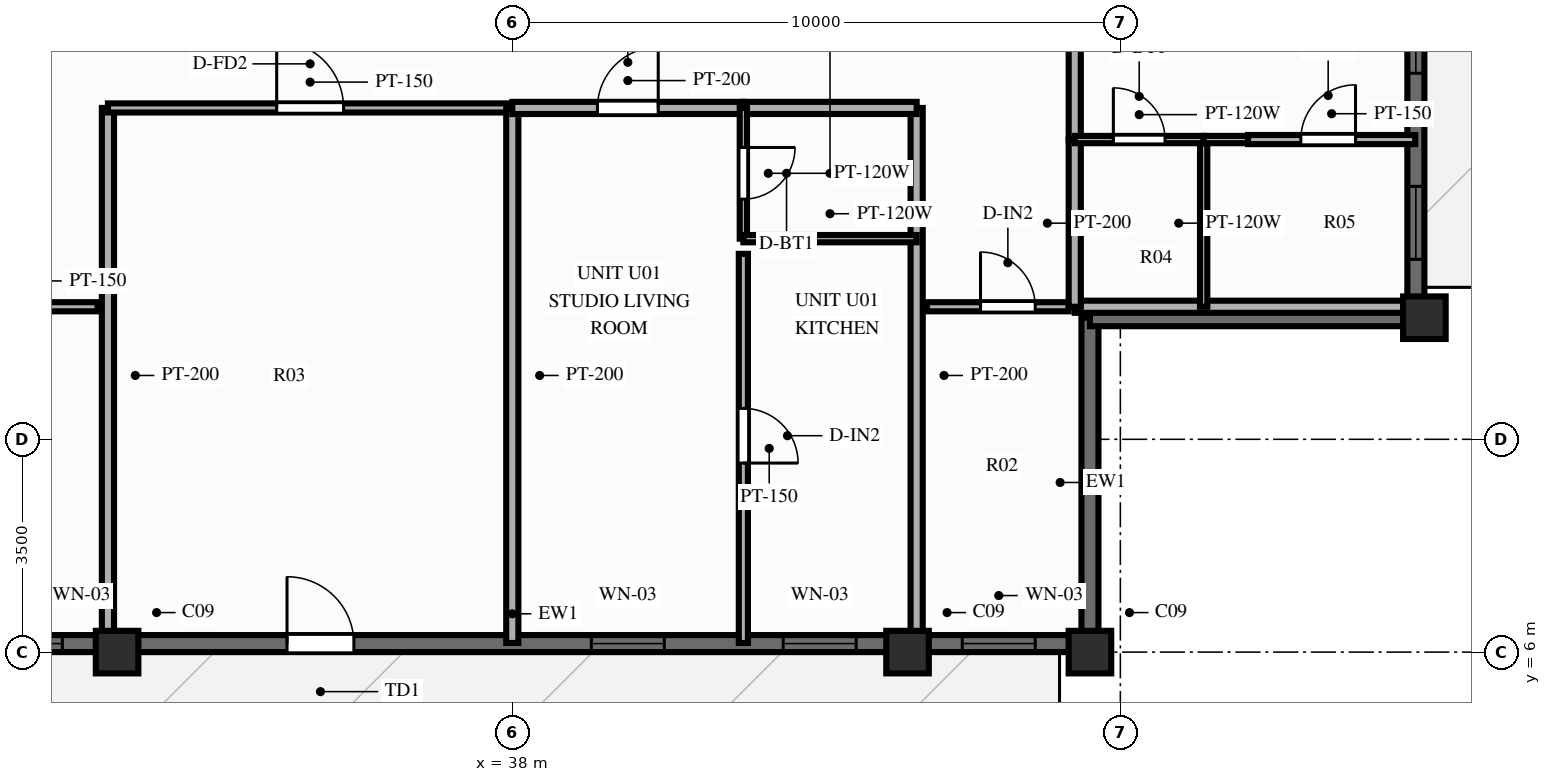
"""IFC4 building model, lengths in metres.
Left out: names, types, materials, properties, quantities, classifications, styles, units other than length and angle.
Written with IfcOpenShell. Run it as: python <this file> out.ifc"""

import sys

from ifc_helpers import new_model, si_unit, direction, frame, frame_2d, origin, origin_2d, place, context, subcontext, project, spatial, rectangle, extrude, source, transform, mapped, element, fill, save


model = new_model("IFC4")
c1 = context("Model", 3, precision=1e-05, world=origin(), true_north=direction((0.0, 1.0)))
c2 = subcontext(c1, "Body", "Model", "MODEL_VIEW")
j1 = project(units=[si_unit("LENGTHUNIT", "METRE"), si_unit("PLANEANGLEUNIT", "RADIAN")], contexts=[c1])
p1 = place(None, origin())
s1 = spatial("IfcSite", under=j1, at=p1, CompositionType="ELEMENT")
p2 = place(p1, origin())
s2 = spatial("IfcBuilding", under=s1, at=p2, CompositionType="ELEMENT")
p3 = place(p2, frame((0.0, 0.0, 240.0)))
s3 = spatial("IfcBuildingStorey", under=s2, at=p3, CompositionType="ELEMENT", Elevation=240.0)
m1 = source(origin(), c2, "Body", "SweptSolid", [
    extrude(rectangle(XDim=0.7, YDim=0.7, at=origin_2d()), origin(), (0.0, 0.0, 1.0), 3.0),
])
for number, where, z_axis, x_axis in (
    (1, (31.5, 6.0, 0.0), (0.0, 0.0, 1.0), (1.0, 0.0, 0.0)),
    (2, (44.5, 6.0, 0.0), (0.0, 0.0, 1.0), (1.0, 0.0, 0.0)),
    (3, (47.5, 6.0, 0.0), (0.0, 0.0, 1.0), (1.0, 0.0, 0.0)),
    (4, (53.0, 11.5, 0.0), (0.0, 0.0, 1.0), (1.0, 0.0, 0.0)),
):
    element("IfcColumn", number, at=place(p3, frame(where, z_axis=z_axis, x_axis=x_axis)), inside=s3, PredefinedType="COLUMN", context=c2, shape_type="MappedRepresentation", body=[
        mapped(m1, transform((0.0, 0.0, 0.0), scale=1.0)),
    ])
p4 = place(p3, frame((28.5, 6.14, 0.0), z_axis=(0.0, 0.0, 1.0), x_axis=(1.0, 0.0, 0.0)))
e5 = element("IfcWall", 5, at=p4, inside=s3, PredefinedType="SOLIDWALL", context=c2, shape_type="SweptSolid", body=[
    extrude(rectangle(XDim=19.0, YDim=0.28, at=frame_2d((9.5, 0.0))), origin(), (0.0, 0.0, 1.0), 2.28),
])
p5 = place(p4, frame((0.9, 0.0, 0.25)))
e6 = element("IfcOpeningElement", 6, at=p5, cuts=e5, PredefinedType="OPENING", context=c2, shape_type="SweptSolid", body=[
    extrude(rectangle(XDim=1.2, YDim=1.5, at=frame_2d((0.6, 0.75))), frame((0.0, 0.152, 0.0), z_axis=(0.0, -1.0, 0.0), x_axis=(1.0, 0.0, 0.0)), (0.0, 0.0, 1.0), 0.304),
])
p6 = place(p4, frame((6.895, 0.0, 0.0), z_axis=(0.0, 0.0, 1.0), x_axis=(-1.0, 0.0, 0.0)))
e7 = element("IfcOpeningElement", 7, at=p6, cuts=e5, PredefinedType="OPENING", context=c2, shape_type="SweptSolid", body=[
    extrude(rectangle(XDim=1.1, YDim=2.15, at=frame_2d((0.55, 1.075))), frame((0.0, 0.152, 0.0), z_axis=(0.0, -1.0, 0.0), x_axis=(1.0, 0.0, 0.0)), (0.0, 0.0, 1.0), 0.304),
])
p7 = place(p4, frame((10.8, 0.0, 0.25)))
e8 = element("IfcOpeningElement", 8, at=p7, cuts=e5, PredefinedType="OPENING", context=c2, shape_type="SweptSolid", body=[
    extrude(rectangle(XDim=1.2, YDim=1.5, at=frame_2d((0.6, 0.75))), frame((0.0, 0.152, 0.0), z_axis=(0.0, -1.0, 0.0), x_axis=(1.0, 0.0, 0.0)), (0.0, 0.0, 1.0), 0.304),
])
p8 = place(p4, frame((13.955, 0.0, 0.25)))
e9 = element("IfcOpeningElement", 9, at=p8, cuts=e5, PredefinedType="OPENING", context=c2, shape_type="SweptSolid", body=[
    extrude(rectangle(XDim=1.2, YDim=1.5, at=frame_2d((0.6, 0.75))), frame((0.0, 0.152, 0.0), z_axis=(0.0, -1.0, 0.0), x_axis=(1.0, 0.0, 0.0)), (0.0, 0.0, 1.0), 0.304),
])
p9 = place(p4, frame((16.9, 0.0, 0.25)))
e10 = element("IfcOpeningElement", 10, at=p9, cuts=e5, PredefinedType="OPENING", context=c2, shape_type="SweptSolid", body=[
    extrude(rectangle(XDim=1.2, YDim=1.5, at=frame_2d((0.6, 0.75))), frame((0.0, 0.152, 0.0), z_axis=(0.0, -1.0, 0.0), x_axis=(1.0, 0.0, 0.0)), (0.0, 0.0, 1.0), 0.304),
])
p10 = place(p3, frame((52.86, 11.5, 0.0), z_axis=(0.0, 0.0, 1.0), x_axis=(0.0, 1.0, 0.0)))
e11 = element("IfcWall", 11, at=p10, inside=s3, PredefinedType="SOLIDWALL", context=c2, shape_type="SweptSolid", body=[
    extrude(rectangle(XDim=31.0, YDim=0.28, at=frame_2d((15.5, 0.0))), origin(), (0.0, 0.0, 1.0), 2.28),
])
p11 = place(p10, frame((0.96, 0.0, 0.25)))
e12 = element("IfcOpeningElement", 12, at=p11, cuts=e11, PredefinedType="OPENING", context=c2, shape_type="SweptSolid", body=[
    extrude(rectangle(XDim=1.2, YDim=1.5, at=frame_2d((0.6, 0.75))), frame((0.0, 0.152, 0.0), z_axis=(0.0, -1.0, 0.0), x_axis=(1.0, 0.0, 0.0)), (0.0, 0.0, 1.0), 0.304),
])
p12 = place(p10, frame((4.02, 0.0, 0.25)))
e13 = element("IfcOpeningElement", 13, at=p12, cuts=e11, PredefinedType="OPENING", context=c2, shape_type="SweptSolid", body=[
    extrude(rectangle(XDim=1.2, YDim=1.5, at=frame_2d((0.6, 0.75))), frame((0.0, 0.152, 0.0), z_axis=(0.0, -1.0, 0.0), x_axis=(1.0, 0.0, 0.0)), (0.0, 0.0, 1.0), 0.304),
])
p13 = place(p10, frame((8.495, 0.0, 0.25)))
e14 = element("IfcOpeningElement", 14, at=p13, cuts=e11, PredefinedType="OPENING", context=c2, shape_type="SweptSolid", body=[
    extrude(rectangle(XDim=1.2, YDim=1.5, at=frame_2d((0.6, 0.75))), frame((0.0, 0.152, 0.0), z_axis=(0.0, -1.0, 0.0), x_axis=(1.0, 0.0, 0.0)), (0.0, 0.0, 1.0), 0.304),
])
p14 = place(p10, frame((12.9, 0.0, 0.25)))
e15 = element("IfcOpeningElement", 15, at=p14, cuts=e11, PredefinedType="OPENING", context=c2, shape_type="SweptSolid", body=[
    extrude(rectangle(XDim=1.2, YDim=1.5, at=frame_2d((0.6, 0.75))), frame((0.0, 0.152, 0.0), z_axis=(0.0, -1.0, 0.0), x_axis=(1.0, 0.0, 0.0)), (0.0, 0.0, 1.0), 0.304),
])
p15 = place(p10, frame((18.75, 0.0, 0.0), z_axis=(0.0, 0.0, 1.0), x_axis=(-1.0, 0.0, 0.0)))
e16 = element("IfcOpeningElement", 16, at=p15, cuts=e11, PredefinedType="OPENING", context=c2, shape_type="SweptSolid", body=[
    extrude(rectangle(XDim=1.6, YDim=2.15, at=frame_2d((0.8, 1.075))), frame((0.0, 0.152, 0.0), z_axis=(0.0, -1.0, 0.0), x_axis=(1.0, 0.0, 0.0)), (0.0, 0.0, 1.0), 0.304),
])
p16 = place(p10, frame((21.755, 0.0, 0.25)))
e17 = element("IfcOpeningElement", 17, at=p16, cuts=e11, PredefinedType="OPENING", context=c2, shape_type="SweptSolid", body=[
    extrude(rectangle(XDim=1.2, YDim=1.5, at=frame_2d((0.6, 0.75))), frame((0.0, 0.152, 0.0), z_axis=(0.0, -1.0, 0.0), x_axis=(1.0, 0.0, 0.0)), (0.0, 0.0, 1.0), 0.304),
])
p17 = place(p10, frame((27.15, 0.0, 0.25)))
e18 = element("IfcOpeningElement", 18, at=p17, cuts=e11, PredefinedType="OPENING", context=c2, shape_type="SweptSolid", body=[
    extrude(rectangle(XDim=1.2, YDim=1.5, at=frame_2d((0.6, 0.75))), frame((0.0, 0.152, 0.0), z_axis=(0.0, -1.0, 0.0), x_axis=(1.0, 0.0, 0.0)), (0.0, 0.0, 1.0), 0.304),
])
for number, where, z_axis, x_axis in (
    (19, (47.5, 6.08, 0.0), (0.0, 0.0, 1.0), (0.0, 1.0, 0.0)),
    (20, (47.5, 11.5, 0.0), (0.0, 0.0, 1.0), (1.0, 0.0, 0.0)),
):
    element("IfcWall", number, at=place(p3, frame(where, z_axis=z_axis, x_axis=x_axis)), inside=s3, PredefinedType="SOLIDWALL", context=c2, shape_type="SweptSolid", body=[
        extrude(rectangle(XDim=5.42, YDim=0.28, at=frame_2d((2.71, 0.0))), origin(), (0.0, 0.0, 1.0), 2.28),
    ])
p18 = place(p3, frame((28.85, 11.68, 0.0), z_axis=(0.0, 0.0, 1.0), x_axis=(1.0, 0.0, 0.0)))
e21 = element("IfcWall", 21, at=p18, inside=s3, PredefinedType="PARTITIONING", context=c2, shape_type="SweptSolid", body=[
    extrude(rectangle(XDim=2.33, YDim=0.15, at=frame_2d((1.165, 0.0))), origin(), (0.0, 0.0, 1.0), 2.79),
])
p19 = place(p18, frame((0.55, 0.0, 0.0)))
e22 = element("IfcOpeningElement", 22, at=p19, cuts=e21, PredefinedType="OPENING", context=c2, shape_type="SweptSolid", body=[
    extrude(rectangle(XDim=0.9, YDim=2.1, at=frame_2d((0.45, 1.05))), frame((0.0, 0.087, 0.0), z_axis=(0.0, -1.0, 0.0), x_axis=(1.0, 0.0, 0.0)), (0.0, 0.0, 1.0), 0.174),
])
p20 = place(p3, frame((44.82, 11.68, 0.0), z_axis=(0.0, 0.0, 1.0), x_axis=(1.0, 0.0, 0.0)))
e23 = element("IfcWall", 23, at=p20, inside=s3, PredefinedType="PARTITIONING", context=c2, shape_type="SweptSolid", body=[
    extrude(rectangle(XDim=2.33, YDim=0.15, at=frame_2d((1.165, 0.0))), origin(), (0.0, 0.0, 1.0), 2.79),
])
p21 = place(p20, frame((0.88, 0.0, 0.0)))
e24 = element("IfcOpeningElement", 24, at=p21, cuts=e23, PredefinedType="OPENING", context=c2, shape_type="SweptSolid", body=[
    extrude(rectangle(XDim=0.9, YDim=2.1, at=frame_2d((0.45, 1.05))), frame((0.0, 0.087, 0.0), z_axis=(0.0, -1.0, 0.0), x_axis=(1.0, 0.0, 0.0)), (0.0, 0.0, 1.0), 0.174),
])
for number, where, z_axis, x_axis in (
    (25, (31.35, 14.95, 0.0), (0.0, 0.0, 1.0), (0.0, -1.0, 0.0)),
    (26, (44.65, 14.95, 0.0), (0.0, 0.0, 1.0), (0.0, -1.0, 0.0)),
):
    element("IfcWall", number, at=place(p3, frame(where, z_axis=z_axis, x_axis=x_axis)), inside=s3, PredefinedType="PARTITIONING", context=c2, shape_type="SweptSolid", body=[
        extrude(rectangle(XDim=8.8, YDim=0.2, at=frame_2d((4.4, 0.0))), origin(), (0.0, 0.0, 1.0), 2.39),
    ])
p22 = place(p3, frame((31.35, 14.95, 0.0), z_axis=(0.0, 0.0, 1.0), x_axis=(1.0, 0.0, 0.0)))
e27 = element("IfcWall", 27, at=p22, inside=s3, PredefinedType="PARTITIONING", context=c2, shape_type="SweptSolid", body=[
    extrude(rectangle(XDim=6.65, YDim=0.15, at=frame_2d((3.325, 0.0))), origin(), (0.0, 0.0, 1.0), 2.79),
])
p23 = place(p22, frame((2.775, 0.0, 0.0)))
e28 = element("IfcOpeningElement", 28, at=p23, cuts=e27, PredefinedType="OPENING", context=c2, shape_type="SweptSolid", body=[
    extrude(rectangle(XDim=1.1, YDim=2.15, at=frame_2d((0.55, 1.075))), frame((0.0, 0.087, 0.0), z_axis=(0.0, -1.0, 0.0), x_axis=(1.0, 0.0, 0.0)), (0.0, 0.0, 1.0), 0.174),
])
p24 = place(p3, frame((38.0, 14.95, 0.0), z_axis=(0.0, 0.0, 1.0), x_axis=(0.0, -1.0, 0.0)))
e29 = element("IfcWall", 29, at=p24, inside=s3, PredefinedType="PARTITIONING", context=c2, shape_type="SweptSolid", body=[
    extrude(rectangle(XDim=8.8, YDim=0.2, at=frame_2d((4.4, 0.0))), origin(), (0.0, 0.0, 1.0), 2.79),
])
p25 = place(p3, frame((38.0, 14.95, 0.0), z_axis=(0.0, 0.0, 1.0), x_axis=(1.0, 0.0, 0.0)))
e30 = element("IfcWall", 30, at=p25, inside=s3, PredefinedType="PARTITIONING", context=c2, shape_type="SweptSolid", body=[
    extrude(rectangle(XDim=3.8, YDim=0.2, at=frame_2d((1.9, 0.0))), origin(), (0.0, 0.0, 1.0), 2.79),
])
p26 = place(p25, frame((1.4, 0.0, 0.0)))
e31 = element("IfcOpeningElement", 31, at=p26, cuts=e30, PredefinedType="OPENING", context=c2, shape_type="SweptSolid", body=[
    extrude(rectangle(XDim=1.0, YDim=2.15, at=frame_2d((0.5, 1.075))), frame((0.0, 0.112, 0.0), z_axis=(0.0, -1.0, 0.0), x_axis=(1.0, 0.0, 0.0)), (0.0, 0.0, 1.0), 0.224),
])
p27 = place(p3, frame((41.8, 14.95, 0.0), z_axis=(0.0, 0.0, 1.0), x_axis=(1.0, 0.0, 0.0)))
e32 = element("IfcWall", 32, at=p27, inside=s3, PredefinedType="PARTITIONING", context=c2, shape_type="SweptSolid", body=[
    extrude(rectangle(XDim=2.85, YDim=0.2, at=frame_2d((1.425, 0.0))), origin(), (0.0, 0.0, 1.0), 2.79),
])
p28 = place(p3, frame((41.8, 14.95, 0.0), z_axis=(0.0, 0.0, 1.0), x_axis=(0.0, -1.0, 0.0)))
e33 = element("IfcWall", 33, at=p28, inside=s3, PredefinedType="PARTITIONING", context=c2, shape_type="SweptSolid", body=[
    extrude(rectangle(XDim=2.15, YDim=0.12, at=frame_2d((1.075, 0.0))), origin(), (0.0, 0.0, 1.0), 2.79),
])
p29 = place(p28, frame((0.65, 0.0, 0.0)))
e34 = element("IfcOpeningElement", 34, at=p29, cuts=e33, PredefinedType="OPENING", context=c2, shape_type="SweptSolid", body=[
    extrude(rectangle(XDim=0.85, YDim=2.05, at=frame_2d((0.425, 1.025))), frame((0.0, 0.072, 0.0), z_axis=(0.0, -1.0, 0.0), x_axis=(1.0, 0.0, 0.0)), (0.0, 0.0, 1.0), 0.144),
])
p30 = place(p3, frame((41.8, 12.8, 0.0), z_axis=(0.0, 0.0, 1.0), x_axis=(1.0, 0.0, 0.0)))
e35 = element("IfcWall", 35, at=p30, inside=s3, PredefinedType="PARTITIONING", context=c2, shape_type="SweptSolid", body=[
    extrude(rectangle(XDim=2.85, YDim=0.12, at=frame_2d((1.425, 0.0))), origin(), (0.0, 0.0, 1.0), 2.79),
])
p31 = place(p3, frame((41.8, 12.55, 0.0), z_axis=(0.0, 0.0, 1.0), x_axis=(0.0, -1.0, 0.0)))
e36 = element("IfcWall", 36, at=p31, inside=s3, PredefinedType="PARTITIONING", context=c2, shape_type="SweptSolid", body=[
    extrude(rectangle(XDim=6.4, YDim=0.15, at=frame_2d((3.2, 0.0))), origin(), (0.0, 0.0, 1.0), 2.79),
])
p32 = place(p31, frame((2.541, 0.0, 0.0)))
e37 = element("IfcOpeningElement", 37, at=p32, cuts=e36, PredefinedType="OPENING", context=c2, shape_type="SweptSolid", body=[
    extrude(rectangle(XDim=0.9, YDim=2.1, at=frame_2d((0.45, 1.05))), frame((0.0, 0.087, 0.0), z_axis=(0.0, -1.0, 0.0), x_axis=(1.0, 0.0, 0.0)), (0.0, 0.0, 1.0), 0.174),
])
p33 = place(p3, frame((47.25, 11.68, 0.0), z_axis=(0.0, 0.0, 1.0), x_axis=(1.0, 0.0, 0.0)))
e38 = element("IfcWall", 38, at=p33, inside=s3, PredefinedType="PARTITIONING", context=c2, shape_type="SweptSolid", body=[
    extrude(rectangle(XDim=5.6, YDim=0.2, at=frame_2d((2.8, 0.0))), origin(), (0.0, 0.0, 1.0), 2.79),
])
p34 = place(p3, frame((47.25, 11.68, 0.0), z_axis=(0.0, 0.0, 1.0), x_axis=(0.0, 1.0, 0.0)))
e39 = element("IfcWall", 39, at=p34, inside=s3, PredefinedType="PARTITIONING", context=c2, shape_type="SweptSolid", body=[
    extrude(rectangle(XDim=2.75, YDim=0.2, at=frame_2d((1.375, 0.0))), origin(), (0.0, 0.0, 1.0), 2.79),
])
p35 = place(p3, frame((47.25, 14.43, 0.0), z_axis=(0.0, 0.0, 1.0), x_axis=(0.0, 1.0, 0.0)))
e40 = element("IfcWall", 40, at=p35, inside=s3, PredefinedType="PARTITIONING", context=c2, shape_type="SweptSolid", body=[
    extrude(rectangle(XDim=8.57, YDim=0.2, at=frame_2d((4.285, 0.0))), origin(), (0.0, 0.0, 1.0), 2.79),
])
p36 = place(p35, frame((3.785, 0.0, 0.0)))
e41 = element("IfcOpeningElement", 41, at=p36, cuts=e40, PredefinedType="OPENING", context=c2, shape_type="SweptSolid", body=[
    extrude(rectangle(XDim=1.0, YDim=2.15, at=frame_2d((0.5, 1.075))), frame((0.0, 0.112, 0.0), z_axis=(0.0, -1.0, 0.0), x_axis=(1.0, 0.0, 0.0)), (0.0, 0.0, 1.0), 0.224),
])
p37 = place(p3, frame((49.37, 11.68, 0.0), z_axis=(0.0, 0.0, 1.0), x_axis=(0.0, 1.0, 0.0)))
e42 = element("IfcWall", 42, at=p37, inside=s3, PredefinedType="PARTITIONING", context=c2, shape_type="SweptSolid", body=[
    extrude(rectangle(XDim=2.75, YDim=0.12, at=frame_2d((1.375, 0.0))), origin(), (0.0, 0.0, 1.0), 2.79),
])
p38 = place(p3, frame((47.25, 14.43, 0.0), z_axis=(0.0, 0.0, 1.0), x_axis=(1.0, 0.0, 0.0)))
e43 = element("IfcWall", 43, at=p38, inside=s3, PredefinedType="PARTITIONING", context=c2, shape_type="SweptSolid", body=[
    extrude(rectangle(XDim=2.12, YDim=0.12, at=frame_2d((1.06, 0.0))), origin(), (0.0, 0.0, 1.0), 2.79),
])
p39 = place(p38, frame((0.635, 0.0, 0.0)))
e44 = element("IfcOpeningElement", 44, at=p39, cuts=e43, PredefinedType="OPENING", context=c2, shape_type="SweptSolid", body=[
    extrude(rectangle(XDim=0.85, YDim=2.05, at=frame_2d((0.425, 1.025))), frame((0.0, 0.072, 0.0), z_axis=(0.0, -1.0, 0.0), x_axis=(1.0, 0.0, 0.0)), (0.0, 0.0, 1.0), 0.144),
])
p40 = place(p3, frame((49.37, 14.43, 0.0), z_axis=(0.0, 0.0, 1.0), x_axis=(1.0, 0.0, 0.0)))
e45 = element("IfcWall", 45, at=p40, inside=s3, PredefinedType="PARTITIONING", context=c2, shape_type="SweptSolid", body=[
    extrude(rectangle(XDim=0.73, YDim=0.12, at=frame_2d((0.365, 0.0))), origin(), (0.0, 0.0, 1.0), 2.79),
])
p41 = place(p3, frame((50.1, 14.43, 0.0), z_axis=(0.0, 0.0, 1.0), x_axis=(1.0, 0.0, 0.0)))
e46 = element("IfcWall", 46, at=p41, inside=s3, PredefinedType="PARTITIONING", context=c2, shape_type="SweptSolid", body=[
    extrude(rectangle(XDim=2.75, YDim=0.15, at=frame_2d((1.375, 0.0))), origin(), (0.0, 0.0, 1.0), 2.79),
])
p42 = place(p41, frame((0.868, 0.0, 0.0)))
e47 = element("IfcOpeningElement", 47, at=p42, cuts=e46, PredefinedType="OPENING", context=c2, shape_type="SweptSolid", body=[
    extrude(rectangle(XDim=0.9, YDim=2.1, at=frame_2d((0.45, 1.05))), frame((0.0, 0.087, 0.0), z_axis=(0.0, -1.0, 0.0), x_axis=(1.0, 0.0, 0.0)), (0.0, 0.0, 1.0), 0.174),
])
m2 = source(origin(), c2, "Body", "SweptSolid", [
    extrude(rectangle(XDim=1.2, YDim=1.5, at=frame_2d((0.6, 0.75))), frame((0.0, 0.03, 0.0), z_axis=(0.0, -1.0, 0.0), x_axis=(1.0, 0.0, 0.0)), (0.0, 0.0, 1.0), 0.06),
])
p43 = place(p5, origin())
e48 = element("IfcWindow", 48, at=p43, inside=s3, PartitioningType="SINGLE_PANEL", PredefinedType="WINDOW", context=c2, shape_type="MappedRepresentation", body=[
    mapped(m2, transform((0.0, 0.0, 0.0), scale=1.0)),
])
fill(e6, e48)
m3 = source(origin(), c2, "Body", "SweptSolid", [
    extrude(rectangle(XDim=1.1, YDim=2.15, at=frame_2d((0.55, 1.075))), frame((0.0, 0.025, 0.0), z_axis=(0.0, -1.0, 0.0), x_axis=(1.0, 0.0, 0.0)), (0.0, 0.0, 1.0), 0.05),
])
p44 = place(p6, origin())
e49 = element("IfcDoor", 49, at=p44, inside=s3, OperationType="SINGLE_SWING_RIGHT", PredefinedType="DOOR", context=c2, shape_type="MappedRepresentation", body=[
    mapped(m3, transform((0.0, 0.0, 0.0), scale=1.0)),
])
fill(e7, e49)
p45 = place(p7, origin())
e50 = element("IfcWindow", 50, at=p45, inside=s3, PartitioningType="SINGLE_PANEL", PredefinedType="WINDOW", context=c2, shape_type="MappedRepresentation", body=[
    mapped(m2, transform((0.0, 0.0, 0.0), scale=1.0)),
])
fill(e8, e50)
p46 = place(p8, origin())
e51 = element("IfcWindow", 51, at=p46, inside=s3, PartitioningType="SINGLE_PANEL", PredefinedType="WINDOW", context=c2, shape_type="MappedRepresentation", body=[
    mapped(m2, transform((0.0, 0.0, 0.0), scale=1.0)),
])
fill(e9, e51)
p47 = place(p9, origin())
e52 = element("IfcWindow", 52, at=p47, inside=s3, PartitioningType="SINGLE_PANEL", PredefinedType="WINDOW", context=c2, shape_type="MappedRepresentation", body=[
    mapped(m2, transform((0.0, 0.0, 0.0), scale=1.0)),
])
fill(e10, e52)
p48 = place(p11, origin())
e53 = element("IfcWindow", 53, at=p48, inside=s3, PartitioningType="SINGLE_PANEL", PredefinedType="WINDOW", context=c2, shape_type="MappedRepresentation", body=[
    mapped(m2, transform((0.0, 0.0, 0.0), scale=1.0)),
])
fill(e12, e53)
p49 = place(p12, origin())
e54 = element("IfcWindow", 54, at=p49, inside=s3, PartitioningType="SINGLE_PANEL", PredefinedType="WINDOW", context=c2, shape_type="MappedRepresentation", body=[
    mapped(m2, transform((0.0, 0.0, 0.0), scale=1.0)),
])
fill(e13, e54)
m4 = source(origin(), c2, "Body", "SweptSolid", [
    extrude(rectangle(XDim=0.9, YDim=2.1, at=frame_2d((0.45, 1.05))), frame((0.0, 0.025, 0.0), z_axis=(0.0, -1.0, 0.0), x_axis=(1.0, 0.0, 0.0)), (0.0, 0.0, 1.0), 0.05),
])
p50 = place(p21, origin())
e55 = element("IfcDoor", 55, at=p50, inside=s3, OperationType="SINGLE_SWING_LEFT", PredefinedType="DOOR", context=c2, shape_type="MappedRepresentation", body=[
    mapped(m4, transform((0.0, 0.0, 0.0), scale=1.0)),
])
fill(e24, e55)
p51 = place(p23, origin())
e56 = element("IfcDoor", 56, at=p51, inside=s3, OperationType="SINGLE_SWING_LEFT", PredefinedType="DOOR", context=c2, shape_type="MappedRepresentation", body=[
    mapped(m3, transform((0.0, 0.0, 0.0), scale=1.0)),
])
fill(e28, e56)
m5 = source(origin(), c2, "Body", "SweptSolid", [
    extrude(rectangle(XDim=1.0, YDim=2.15, at=frame_2d((0.5, 1.075))), frame((0.0, 0.025, 0.0), z_axis=(0.0, -1.0, 0.0), x_axis=(1.0, 0.0, 0.0)), (0.0, 0.0, 1.0), 0.05),
])
p52 = place(p26, origin())
e57 = element("IfcDoor", 57, at=p52, inside=s3, OperationType="SINGLE_SWING_RIGHT", PredefinedType="DOOR", context=c2, shape_type="MappedRepresentation", body=[
    mapped(m5, transform((0.0, 0.0, 0.0), scale=1.0)),
])
fill(e31, e57)
m6 = source(origin(), c2, "Body", "SweptSolid", [
    extrude(rectangle(XDim=0.85, YDim=2.05, at=frame_2d((0.425, 1.025))), frame((0.0, 0.025, 0.0), z_axis=(0.0, -1.0, 0.0), x_axis=(1.0, 0.0, 0.0)), (0.0, 0.0, 1.0), 0.05),
])
p53 = place(p29, origin())
e58 = element("IfcDoor", 58, at=p53, inside=s3, OperationType="SINGLE_SWING_LEFT", PredefinedType="DOOR", context=c2, shape_type="MappedRepresentation", body=[
    mapped(m6, transform((0.0, 0.0, 0.0), scale=1.0)),
])
fill(e34, e58)
p54 = place(p32, origin())
e59 = element("IfcDoor", 59, at=p54, inside=s3, OperationType="SINGLE_SWING_RIGHT", PredefinedType="DOOR", context=c2, shape_type="MappedRepresentation", body=[
    mapped(m4, transform((0.0, 0.0, 0.0), scale=1.0)),
])
fill(e37, e59)
p55 = place(p39, origin())
e60 = element("IfcDoor", 60, at=p55, inside=s3, OperationType="SINGLE_SWING_LEFT", PredefinedType="DOOR", context=c2, shape_type="MappedRepresentation", body=[
    mapped(m6, transform((0.0, 0.0, 0.0), scale=1.0)),
])
fill(e44, e60)
p56 = place(p42, origin())
e61 = element("IfcDoor", 61, at=p56, inside=s3, OperationType="SINGLE_SWING_RIGHT", PredefinedType="DOOR", context=c2, shape_type="MappedRepresentation", body=[
    mapped(m4, transform((0.0, 0.0, 0.0), scale=1.0)),
])
fill(e47, e61)
save(model, sys.argv[1])
